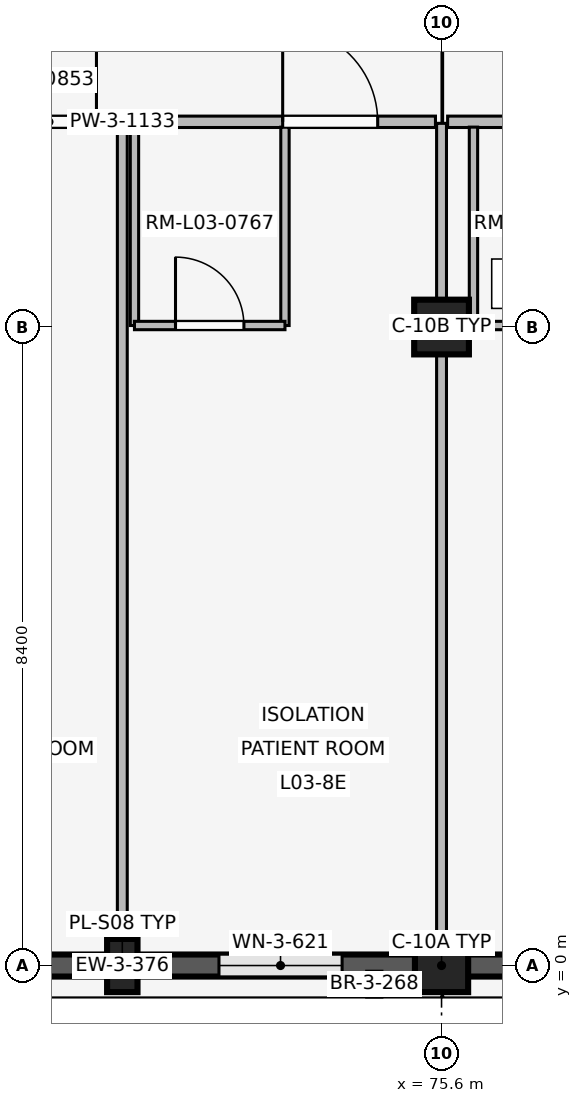
"""IFC4 building model, lengths in metres.
Left out: names, types, materials, properties, quantities, classifications, styles, units other than length and angle.
Written with IfcOpenShell. Run it as: python <this file> out.ifc"""

import sys

from ifc_helpers import new_model, si_unit, direction, frame, frame_2d, origin, origin_2d, place, context, subcontext, project, spatial, rectangle, extrude, element, fill, save


model = new_model("IFC4")
c1 = context("Model", 3, precision=1e-05, world=origin(), true_north=direction((0.0, 1.0)))
c2 = subcontext(c1, "Body", "Model", "MODEL_VIEW")
j1 = project(units=[si_unit("LENGTHUNIT", "METRE"), si_unit("PLANEANGLEUNIT", "RADIAN")], contexts=[c1])
p1 = place(None, origin())
s1 = spatial("IfcSite", under=j1, at=p1, CompositionType="ELEMENT")
p2 = place(p1, origin())
s2 = spatial("IfcBuilding", under=s1, at=p2, CompositionType="ELEMENT")
p3 = place(p2, frame((0.0, 0.0, 12.9)))
s3 = spatial("IfcBuildingStorey", under=s2, at=p3, CompositionType="ELEMENT", Elevation=12.9)
p4 = place(p3, frame((75.6, 0.0, 0.0), z_axis=(0.0, 0.0, 1.0), x_axis=(1.0, 0.0, 0.0)))
e1 = element("IfcColumn", 1, at=p4, inside=s3, PredefinedType="COLUMN", context=c2, shape_type="SweptSolid", body=[
    extrude(rectangle(XDim=0.7, YDim=0.7, at=origin_2d()), origin(), (0.0, 0.0, 1.0), 3.3),
])
p5 = place(p3, frame((75.6, 8.4, 0.0), z_axis=(0.0, 0.0, 1.0), x_axis=(1.0, 0.0, 0.0)))
e2 = element("IfcColumn", 2, at=p5, inside=s3, PredefinedType="COLUMN", context=c2, shape_type="SweptSolid", body=[
    extrude(rectangle(XDim=0.72, YDim=0.72, at=origin_2d()), origin(), (0.0, 0.0, 1.0), 3.3),
])
p6 = place(p3, frame((71.4, 0.0, 0.0), z_axis=(0.0, 0.0, 1.0), x_axis=(1.0, 0.0, 0.0)))
e3 = element("IfcColumn", 3, at=p6, inside=s3, PredefinedType="PILASTER", context=c2, shape_type="SweptSolid", body=[
    extrude(rectangle(XDim=0.4, YDim=0.7, at=origin_2d()), origin(), (0.0, 0.0, 1.0), 3.3),
])
p7 = place(p3, frame((75.255, 0.0, 0.0), z_axis=(0.0, 0.0, 1.0), x_axis=(-1.0, 0.0, 0.0)))
e4 = element("IfcWall", 4, at=p7, inside=s3, PredefinedType="SOLIDWALL", context=c2, shape_type="SweptSolid", body=[
    extrude(rectangle(XDim=7.71, YDim=0.29, at=frame_2d((3.855, 0.0))), origin(), (0.0, 0.0, 1.0), 2.44),
])
p8 = place(p7, frame((0.963, 0.0, 0.85)))
e5 = element("IfcOpeningElement", 5, at=p8, cuts=e4, PredefinedType="OPENING", context=c2, shape_type="SweptSolid", body=[
    extrude(rectangle(XDim=1.62, YDim=0.95, at=frame_2d((0.81, 0.475))), frame((0.0, 0.155, 0.0), z_axis=(0.0, -1.0, 0.0), x_axis=(1.0, 0.0, 0.0)), (0.0, 0.0, 1.0), 0.31),
])
p9 = place(p7, frame((5.127, 0.0, 0.85)))
e6 = element("IfcOpeningElement", 6, at=p9, cuts=e4, PredefinedType="OPENING", context=c2, shape_type="SweptSolid", body=[
    extrude(rectangle(XDim=1.62, YDim=0.95, at=frame_2d((0.81, 0.475))), frame((0.0, 0.155, 0.0), z_axis=(0.0, -1.0, 0.0), x_axis=(1.0, 0.0, 0.0)), (0.0, 0.0, 1.0), 0.31),
])
p10 = place(p3, frame((74.715, -0.075, 0.0), z_axis=(0.0, 0.0, 1.0), x_axis=(0.0, -1.0, 0.0)))
e7 = element("IfcWall", 7, at=p10, inside=s3, PredefinedType="ELEMENTEDWALL", context=c2, shape_type="SweptSolid", body=[
    extrude(rectangle(XDim=0.34, YDim=0.2, at=frame_2d((0.17, 0.0))), origin(), (0.0, 0.0, 1.0), 2.42),
])
p11 = place(p3, frame((83.655, 0.0, 0.0), z_axis=(0.0, 0.0, 1.0), x_axis=(-1.0, 0.0, 0.0)))
e8 = element("IfcWall", 8, at=p11, inside=s3, PredefinedType="SOLIDWALL", context=c2, shape_type="SweptSolid", body=[
    extrude(rectangle(XDim=7.71, YDim=0.29, at=frame_2d((3.855, 0.0))), origin(), (0.0, 0.0, 1.0), 2.44),
])
p12 = place(p11, frame((1.043, 0.0, 0.85)))
e9 = element("IfcOpeningElement", 9, at=p12, cuts=e8, PredefinedType="OPENING", context=c2, shape_type="SweptSolid", body=[
    extrude(rectangle(XDim=1.46, YDim=0.85, at=frame_2d((0.73, 0.425))), frame((0.0, 0.155, 0.0), z_axis=(0.0, -1.0, 0.0), x_axis=(1.0, 0.0, 0.0)), (0.0, 0.0, 1.0), 0.31),
])
p13 = place(p11, frame((5.207, 0.0, 0.85)))
e10 = element("IfcOpeningElement", 10, at=p13, cuts=e8, PredefinedType="OPENING", context=c2, shape_type="SweptSolid", body=[
    extrude(rectangle(XDim=1.46, YDim=0.85, at=frame_2d((0.73, 0.425))), frame((0.0, 0.155, 0.0), z_axis=(0.0, -1.0, 0.0), x_axis=(1.0, 0.0, 0.0)), (0.0, 0.0, 1.0), 0.31),
])
p14 = place(p3, frame((67.28, 11.1, 0.0), z_axis=(0.0, 0.0, 1.0), x_axis=(1.0, 0.0, 0.0)))
e11 = element("IfcWall", 11, at=p14, inside=s3, PredefinedType="PARTITIONING", context=c2, shape_type="SweptSolid", body=[
    extrude(rectangle(XDim=8.24, YDim=0.15, at=frame_2d((4.12, 0.0))), origin(), (0.0, 0.0, 1.0), 2.42),
])
p15 = place(p14, frame((2.53, 0.0, 0.0)))
e12 = element("IfcOpeningElement", 12, at=p15, cuts=e11, PredefinedType="OPENING", context=c2, shape_type="SweptSolid", body=[
    extrude(rectangle(XDim=1.25, YDim=2.2, at=frame_2d((0.625, 1.1))), frame((0.0, 0.085, 0.0), z_axis=(0.0, -1.0, 0.0), x_axis=(1.0, 0.0, 0.0)), (0.0, 0.0, 1.0), 0.17),
])
p16 = place(p14, frame((6.23, 0.0, 0.0)))
e13 = element("IfcOpeningElement", 13, at=p16, cuts=e11, PredefinedType="OPENING", context=c2, shape_type="SweptSolid", body=[
    extrude(rectangle(XDim=1.25, YDim=2.2, at=frame_2d((0.625, 1.1))), frame((0.0, 0.085, 0.0), z_axis=(0.0, -1.0, 0.0), x_axis=(1.0, 0.0, 0.0)), (0.0, 0.0, 1.0), 0.17),
])
p17 = place(p3, frame((71.4, 0.1, 0.0), z_axis=(0.0, 0.0, 1.0), x_axis=(0.0, 1.0, 0.0)))
e14 = element("IfcWall", 14, at=p17, inside=s3, PredefinedType="PARTITIONING", context=c2, shape_type="SweptSolid", body=[
    extrude(rectangle(XDim=10.93, YDim=0.13, at=frame_2d((5.465, 0.0))), origin(), (0.0, 0.0, 1.0), 2.42),
])
for number, where, z_axis, x_axis in (
    (15, (71.56, 8.42, 0.0), (0.0, 0.0, 1.0), (0.0, 1.0, 0.0)),
    (16, (73.54, 8.42, 0.0), (0.0, 0.0, 1.0), (0.0, 1.0, 0.0)),
):
    element("IfcWall", number, at=place(p3, frame(where, z_axis=z_axis, x_axis=x_axis)), inside=s3, PredefinedType="PARTITIONING", context=c2, shape_type="SweptSolid", body=[
        extrude(rectangle(XDim=2.61, YDim=0.11, at=frame_2d((1.305, 0.0))), origin(), (0.0, 0.0, 1.0), 2.42),
    ])
p18 = place(p3, frame((71.56, 8.42, 0.0), z_axis=(0.0, 0.0, 1.0), x_axis=(1.0, 0.0, 0.0)))
e17 = element("IfcWall", 17, at=p18, inside=s3, PredefinedType="PARTITIONING", context=c2, shape_type="SweptSolid", body=[
    extrude(rectangle(XDim=1.98, YDim=0.11, at=frame_2d((0.99, 0.0))), origin(), (0.0, 0.0, 1.0), 2.42),
])
p19 = place(p18, frame((0.54, 0.0, 0.0)))
e18 = element("IfcOpeningElement", 18, at=p19, cuts=e17, PredefinedType="OPENING", context=c2, shape_type="SweptSolid", body=[
    extrude(rectangle(XDim=0.9, YDim=2.1, at=frame_2d((0.45, 1.05))), frame((0.0, 0.065, 0.0), z_axis=(0.0, -1.0, 0.0), x_axis=(1.0, 0.0, 0.0)), (0.0, 0.0, 1.0), 0.13),
])
p20 = place(p3, frame((75.6, 0.14, 0.0), z_axis=(0.0, 0.0, 1.0), x_axis=(0.0, 1.0, 0.0)))
e19 = element("IfcWall", 19, at=p20, inside=s3, PredefinedType="PARTITIONING", context=c2, shape_type="SweptSolid", body=[
    extrude(rectangle(XDim=10.94, YDim=0.13, at=frame_2d((5.47, 0.0))), origin(), (0.0, 0.0, 1.0), 2.42),
])
p21 = place(p3, frame((75.68, 11.1, 0.0), z_axis=(0.0, 0.0, 1.0), x_axis=(1.0, 0.0, 0.0)))
e20 = element("IfcWall", 20, at=p21, inside=s3, PredefinedType="PARTITIONING", context=c2, shape_type="SweptSolid", body=[
    extrude(rectangle(XDim=8.24, YDim=0.15, at=frame_2d((4.12, 0.0))), origin(), (0.0, 0.0, 1.0), 2.42),
])
p22 = place(p21, frame((2.53, 0.0, 0.0)))
e21 = element("IfcOpeningElement", 21, at=p22, cuts=e20, PredefinedType="OPENING", context=c2, shape_type="SweptSolid", body=[
    extrude(rectangle(XDim=1.32, YDim=2.25, at=frame_2d((0.66, 1.125))), frame((0.0, 0.085, 0.0), z_axis=(0.0, -1.0, 0.0), x_axis=(1.0, 0.0, 0.0)), (0.0, 0.0, 1.0), 0.17),
])
p23 = place(p21, frame((6.23, 0.0, 0.0)))
e22 = element("IfcOpeningElement", 22, at=p23, cuts=e20, PredefinedType="OPENING", context=c2, shape_type="SweptSolid", body=[
    extrude(rectangle(XDim=1.32, YDim=2.25, at=frame_2d((0.66, 1.125))), frame((0.0, 0.085, 0.0), z_axis=(0.0, -1.0, 0.0), x_axis=(1.0, 0.0, 0.0)), (0.0, 0.0, 1.0), 0.17),
])
p24 = place(p3, frame((76.02, 8.42, 0.0), z_axis=(0.0, 0.0, 1.0), x_axis=(0.0, 1.0, 0.0)))
e23 = element("IfcWall", 23, at=p24, inside=s3, PredefinedType="PARTITIONING", context=c2, shape_type="SweptSolid", body=[
    extrude(rectangle(XDim=2.61, YDim=0.11, at=frame_2d((1.305, 0.0))), origin(), (0.0, 0.0, 1.0), 2.42),
])
p25 = place(p3, frame((76.02, 8.42, 0.0), z_axis=(0.0, 0.0, 1.0), x_axis=(1.0, 0.0, 0.0)))
e24 = element("IfcWall", 24, at=p25, inside=s3, PredefinedType="PARTITIONING", context=c2, shape_type="SweptSolid", body=[
    extrude(rectangle(XDim=1.98, YDim=0.11, at=frame_2d((0.99, 0.0))), origin(), (0.0, 0.0, 1.0), 2.42),
])
p26 = place(p25, frame((0.54, 0.0, 0.0)))
e25 = element("IfcOpeningElement", 25, at=p26, cuts=e24, PredefinedType="OPENING", context=c2, shape_type="SweptSolid", body=[
    extrude(rectangle(XDim=0.9, YDim=2.1, at=frame_2d((0.45, 1.05))), frame((0.0, 0.065, 0.0), z_axis=(0.0, -1.0, 0.0), x_axis=(1.0, 0.0, 0.0)), (0.0, 0.0, 1.0), 0.13),
])
p27 = place(p8, origin())
e26 = element("IfcWindow", 26, at=p27, inside=s3, PartitioningType="SINGLE_PANEL", PredefinedType="WINDOW", context=c2, shape_type="SweptSolid", body=[
    extrude(rectangle(XDim=1.62, YDim=0.95, at=frame_2d((0.81, 0.475))), frame((0.0, 0.03, 0.0), z_axis=(0.0, -1.0, 0.0), x_axis=(1.0, 0.0, 0.0)), (0.0, 0.0, 1.0), 0.06),
])
fill(e5, e26)
p28 = place(p15, origin())
e27 = element("IfcDoor", 27, at=p28, inside=s3, OperationType="SINGLE_SWING_RIGHT", PredefinedType="DOOR", context=c2, shape_type="SweptSolid", body=[
    extrude(rectangle(XDim=1.25, YDim=2.2, at=frame_2d((0.625, 1.1))), frame((0.0, 0.025, 0.0), z_axis=(0.0, -1.0, 0.0), x_axis=(1.0, 0.0, 0.0)), (0.0, 0.0, 1.0), 0.05),
])
fill(e12, e27)
p29 = place(p16, origin())
e28 = element("IfcDoor", 28, at=p29, inside=s3, OperationType="SINGLE_SWING_LEFT", PredefinedType="DOOR", context=c2, shape_type="SweptSolid", body=[
    extrude(rectangle(XDim=1.25, YDim=2.2, at=frame_2d((0.625, 1.1))), frame((0.0, 0.025, 0.0), z_axis=(0.0, -1.0, 0.0), x_axis=(1.0, 0.0, 0.0)), (0.0, 0.0, 1.0), 0.05),
])
fill(e13, e28)
p30 = place(p19, origin())
e29 = element("IfcDoor", 29, at=p30, inside=s3, OperationType="SINGLE_SWING_LEFT", PredefinedType="DOOR", context=c2, shape_type="SweptSolid", body=[
    extrude(rectangle(XDim=0.9, YDim=2.1, at=frame_2d((0.45, 1.05))), frame((0.0, 0.025, 0.0), z_axis=(0.0, -1.0, 0.0), x_axis=(1.0, 0.0, 0.0)), (0.0, 0.0, 1.0), 0.05),
])
fill(e18, e29)
save(model, sys.argv[1])
